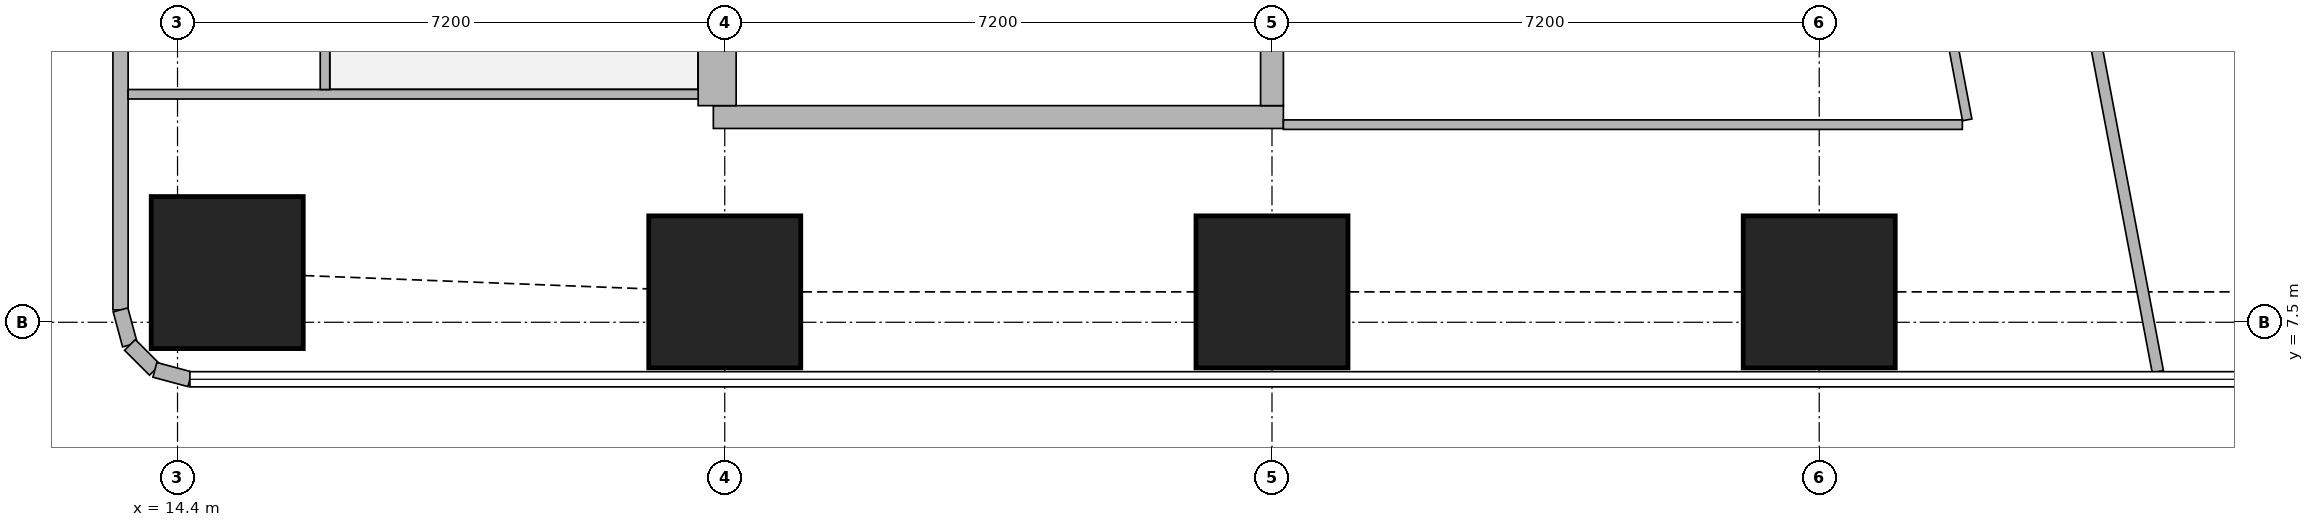
"""IFC4 building model, lengths in metres.
Left out: names, types, materials, properties, quantities, classifications, styles, units other than length and angle.
Written with IfcOpenShell. Run it as: python <this file> out.ifc"""

import sys

from ifc_helpers import new_model, si_unit, direction, frame, frame_2d, origin, origin_2d, place, context, subcontext, project, spatial, rectangle, extrude, element, fill, save


model = new_model("IFC4")
c1 = context("Model", 3, precision=1e-05, world=origin(), true_north=direction((0.0, 1.0)))
c2 = subcontext(c1, "Body", "Model", "MODEL_VIEW")
j1 = project(units=[si_unit("LENGTHUNIT", "METRE"), si_unit("PLANEANGLEUNIT", "RADIAN")], contexts=[c1])
p1 = place(None, origin())
s1 = spatial("IfcSite", under=j1, at=p1, CompositionType="ELEMENT")
p2 = place(p1, origin())
s2 = spatial("IfcBuilding", under=s1, at=p2, CompositionType="ELEMENT")
p3 = place(p2, frame((0.0, 0.0, 274.1)))
s3 = spatial("IfcBuildingStorey", under=s2, at=p3, CompositionType="ELEMENT", Elevation=274.1)
for number, where, z_axis, x_axis in (
    (1, (15.054, 8.154, 0.0), (0.0, 0.0, 1.0), (1.0, 0.0, 0.0)),
    (2, (21.6, 7.9, 0.0), (0.0, 0.0, 1.0), (1.0, 0.0, 0.0)),
    (3, (28.8, 7.9, 0.0), (0.0, 0.0, 1.0), (1.0, 0.0, 0.0)),
    (4, (36.0, 7.9, 0.0), (0.0, 0.0, 1.0), (1.0, 0.0, 0.0)),
):
    element("IfcColumn", number, at=place(p3, frame(where, z_axis=z_axis, x_axis=x_axis)), inside=s3, PredefinedType="COLUMN", context=c2, shape_type="SweptSolid", body=[
        extrude(rectangle(XDim=2.0, YDim=2.0, at=origin_2d()), origin(), (0.0, 0.0, 1.0), 3.75),
    ])
p4 = place(p3, frame((21.45, 10.2, 0.0), z_axis=(0.0, 0.0, 1.0), x_axis=(1.0, 0.0, 0.0)))
e5 = element("IfcWall", 5, at=p4, inside=s3, PredefinedType="SHEAR", context=c2, shape_type="SweptSolid", body=[
    extrude(rectangle(XDim=7.5, YDim=0.3, at=frame_2d((3.75, 0.0))), origin(), (0.0, 0.0, 1.0), 3.75),
])
p5 = place(p4, frame((1.2, 0.0, 0.0)))
e6 = element("IfcOpeningElement", 6, at=p5, cuts=e5, PredefinedType="OPENING", context=c2, shape_type="SweptSolid", body=[
    extrude(rectangle(XDim=1.1, YDim=2.1, at=frame_2d((0.55, 1.05))), frame((0.0, 0.16, 0.0), z_axis=(0.0, -1.0, 0.0), x_axis=(1.0, 0.0, 0.0)), (0.0, 0.0, 1.0), 0.32),
])
p6 = place(p3, frame((21.5, 10.35, 0.0), z_axis=(0.0, 0.0, 1.0), x_axis=(0.0, 1.0, 0.0)))
e7 = element("IfcWall", 7, at=p6, inside=s3, PredefinedType="SHEAR", context=c2, shape_type="SweptSolid", body=[
    extrude(rectangle(XDim=4.2, YDim=0.5, at=frame_2d((2.1, 0.0))), origin(), (0.0, 0.0, 1.0), 3.75),
])
p7 = place(p3, frame((28.8, 10.35, 0.0), z_axis=(0.0, 0.0, 1.0), x_axis=(0.0, 1.0, 0.0)))
e8 = element("IfcWall", 8, at=p7, inside=s3, PredefinedType="SHEAR", context=c2, shape_type="SweptSolid", body=[
    extrude(rectangle(XDim=4.2, YDim=0.3, at=frame_2d((2.1, 0.0))), origin(), (0.0, 0.0, 1.0), 3.75),
])
p8 = place(p3, frame((13.65, 43.037, 0.0), z_axis=(0.0, 0.0, 1.0), x_axis=(0.0, -1.0, 0.0)))
e9 = element("IfcWall", 9, at=p8, inside=s3, PredefinedType="SOLIDWALL", context=c2, shape_type="SweptSolid", body=[
    extrude(rectangle(XDim=35.374, YDim=0.2, at=frame_2d((17.687, 0.0))), origin(), (0.0, 0.0, 1.0), 3.5),
])
p9 = place(p8, frame((1.959, 0.0, 0.9)))
e10 = element("IfcOpeningElement", 10, at=p9, cuts=e9, PredefinedType="OPENING", context=c2, shape_type="SweptSolid", body=[
    extrude(rectangle(XDim=1.8, YDim=1.5, at=frame_2d((0.9, 0.75))), frame((0.0, 0.11, 0.0), z_axis=(0.0, -1.0, 0.0), x_axis=(1.0, 0.0, 0.0)), (0.0, 0.0, 1.0), 0.22),
])
p10 = place(p3, frame((13.65, 7.663, 0.0), z_axis=(0.0, 0.0, 1.0), x_axis=(0.259698463175, -0.965689757751, 0.0)))
e11 = element("IfcWall", 11, at=p10, inside=s3, PredefinedType="SOLIDWALL", context=c2, shape_type="SweptSolid", body=[
    extrude(rectangle(XDim=0.478, YDim=0.2, at=frame_2d((0.239, 0.0))), origin(), (0.0, 0.0, 1.0), 3.5),
])
p11 = place(p3, frame((13.774, 7.202, 0.0), z_axis=(0.0, 0.0, 1.0), x_axis=(0.707369890659, -0.706843573776, 0.0)))
e12 = element("IfcWall", 12, at=p11, inside=s3, PredefinedType="SOLIDWALL", context=c2, shape_type="SweptSolid", body=[
    extrude(rectangle(XDim=0.464, YDim=0.2, at=frame_2d((0.232, 0.0))), origin(), (0.0, 0.0, 1.0), 3.5),
])
p12 = place(p3, frame((14.102, 6.874, 0.0), z_axis=(0.0, 0.0, 1.0), x_axis=(0.965655254015, -0.259826731483, 0.0)))
e13 = element("IfcWall", 13, at=p12, inside=s3, PredefinedType="SOLIDWALL", context=c2, shape_type="SweptSolid", body=[
    extrude(rectangle(XDim=0.477, YDim=0.2, at=frame_2d((0.239, 0.0))), origin(), (0.0, 0.0, 1.0), 3.5),
])
p13 = place(p3, frame((33.781, 42.186, 0.0), z_axis=(0.0, 0.0, 1.0), x_axis=(0.185593518645, -0.9826266055, 0.0)))
e14 = element("IfcWall", 14, at=p13, inside=s3, PredefinedType="SOLIDWALL", context=c2, shape_type="SweptSolid", body=[
    extrude(rectangle(XDim=35.961, YDim=0.15, at=frame_2d((17.98, 0.0))), origin(), (0.0, 0.0, 1.0), 2.5),
])
p14 = place(p13, frame((11.76, 0.0, 0.0)))
e15 = element("IfcOpeningElement", 15, at=p14, cuts=e14, PredefinedType="OPENING", context=c2, shape_type="SweptSolid", body=[
    extrude(rectangle(XDim=1.0, YDim=2.1, at=frame_2d((0.5, 1.05))), frame((0.0, 0.085, 0.0), z_axis=(0.0, -1.0, 0.0), x_axis=(1.0, 0.0, 0.0)), (0.0, 0.0, 1.0), 0.17),
])
p15 = place(p13, frame((15.576, 0.0, 0.0)))
e16 = element("IfcOpeningElement", 16, at=p15, cuts=e14, PredefinedType="OPENING", context=c2, shape_type="SweptSolid", body=[
    extrude(rectangle(XDim=1.0, YDim=2.1, at=frame_2d((0.5, 1.05))), frame((0.0, 0.085, 0.0), z_axis=(0.0, -1.0, 0.0), x_axis=(1.0, 0.0, 0.0)), (0.0, 0.0, 1.0), 0.17),
])
p16 = place(p13, frame((30.502, 0.0, 0.0)))
e17 = element("IfcOpeningElement", 17, at=p16, cuts=e14, PredefinedType="OPENING", context=c2, shape_type="SweptSolid", body=[
    extrude(rectangle(XDim=1.0, YDim=2.1, at=frame_2d((0.5, 1.05))), frame((0.0, 0.085, 0.0), z_axis=(0.0, -1.0, 0.0), x_axis=(1.0, 0.0, 0.0)), (0.0, 0.0, 1.0), 0.17),
])
p17 = place(p3, frame((13.75, 10.5, 0.0), z_axis=(0.0, 0.0, 1.0), x_axis=(1.0, 0.0, 0.0)))
e18 = element("IfcWall", 18, at=p17, inside=s3, PredefinedType="PARTITIONING", context=c2, shape_type="SweptSolid", body=[
    extrude(rectangle(XDim=7.5, YDim=0.125, at=frame_2d((3.75, 0.0))), origin(), (0.0, 0.0, 1.0), 3.5),
])
p18 = place(p17, frame((4.245, 0.0, 0.0)))
e19 = element("IfcOpeningElement", 19, at=p18, cuts=e18, PredefinedType="OPENING", context=c2, shape_type="SweptSolid", body=[
    extrude(rectangle(XDim=1.8, YDim=2.1, at=frame_2d((0.9, 1.05))), frame((0.0, 0.073, 0.0), z_axis=(0.0, -1.0, 0.0), x_axis=(1.0, 0.0, 0.0)), (0.0, 0.0, 1.0), 0.145),
])
p19 = place(p3, frame((16.34, 10.562, 0.0), z_axis=(0.0, 0.0, 1.0), x_axis=(0.0, 1.0, 0.0)))
e20 = element("IfcWall", 20, at=p19, inside=s3, PredefinedType="PARTITIONING", context=c2, shape_type="SweptSolid", body=[
    extrude(rectangle(XDim=3.988, YDim=0.125, at=frame_2d((1.994, 0.0))), origin(), (0.0, 0.0, 1.0), 3.5),
])
p20 = place(p19, frame((1.438, 0.0, 0.0)))
e21 = element("IfcOpeningElement", 21, at=p20, cuts=e20, PredefinedType="OPENING", context=c2, shape_type="SweptSolid", body=[
    extrude(rectangle(XDim=1.0, YDim=2.1, at=frame_2d((0.5, 1.05))), frame((0.0, 0.073, 0.0), z_axis=(0.0, -1.0, 0.0), x_axis=(1.0, 0.0, 0.0)), (0.0, 0.0, 1.0), 0.145),
])
p21 = place(p3, frame((28.95, 10.1, 0.0), z_axis=(0.0, 0.0, 1.0), x_axis=(1.0, 0.0, 0.0)))
e22 = element("IfcWall", 22, at=p21, inside=s3, PredefinedType="PARTITIONING", context=c2, shape_type="SweptSolid", body=[
    extrude(rectangle(XDim=8.933, YDim=0.125, at=frame_2d((4.467, 0.0))), origin(), (0.0, 0.0, 1.0), 3.5),
])
p22 = place(p3, frame((37.947, 10.163, 0.0), z_axis=(0.0, 0.0, 1.0), x_axis=(-0.185572770922, 0.982630523998, 0.0)))
e23 = element("IfcWall", 23, at=p22, inside=s3, PredefinedType="PARTITIONING", context=c2, shape_type="SweptSolid", body=[
    extrude(rectangle(XDim=25.111, YDim=0.125, at=frame_2d((12.556, 0.0))), origin(), (0.0, 0.0, 1.0), 2.5),
])
p23 = place(p22, frame((0.708, 0.0, 0.0)))
e24 = element("IfcOpeningElement", 24, at=p23, cuts=e23, PredefinedType="OPENING", context=c2, shape_type="SweptSolid", body=[
    extrude(rectangle(XDim=1.0, YDim=2.1, at=frame_2d((0.5, 1.05))), frame((0.0, 0.073, 0.0), z_axis=(0.0, -1.0, 0.0), x_axis=(1.0, 0.0, 0.0)), (0.0, 0.0, 1.0), 0.145),
])
p24 = place(p22, frame((5.9, 0.0, 0.0)))
e25 = element("IfcOpeningElement", 25, at=p24, cuts=e23, PredefinedType="OPENING", context=c2, shape_type="SweptSolid", body=[
    extrude(rectangle(XDim=1.0, YDim=2.1, at=frame_2d((0.5, 1.05))), frame((0.0, 0.073, 0.0), z_axis=(0.0, -1.0, 0.0), x_axis=(1.0, 0.0, 0.0)), (0.0, 0.0, 1.0), 0.145),
])
p25 = place(p22, frame((13.378, 0.0, 0.0)))
e26 = element("IfcOpeningElement", 26, at=p25, cuts=e23, PredefinedType="OPENING", context=c2, shape_type="SweptSolid", body=[
    extrude(rectangle(XDim=1.0, YDim=2.1, at=frame_2d((0.5, 1.05))), frame((0.0, 0.073, 0.0), z_axis=(0.0, -1.0, 0.0), x_axis=(1.0, 0.0, 0.0)), (0.0, 0.0, 1.0), 0.145),
])
p26 = place(p22, frame((21.15, 0.0, 0.0)))
e27 = element("IfcOpeningElement", 27, at=p26, cuts=e23, PredefinedType="OPENING", context=c2, shape_type="SweptSolid", body=[
    extrude(rectangle(XDim=1.0, YDim=2.1, at=frame_2d((0.5, 1.05))), frame((0.0, 0.073, 0.0), z_axis=(0.0, -1.0, 0.0), x_axis=(1.0, 0.0, 0.0)), (0.0, 0.0, 1.0), 0.145),
])
p27 = place(p18, origin())
e28 = element("IfcDoor", 28, at=p27, inside=s3, OperationType="DOUBLE_DOOR_SINGLE_SWING", PredefinedType="DOOR", context=c2, shape_type="SweptSolid", body=[
    extrude(rectangle(XDim=1.8, YDim=2.1, at=frame_2d((0.9, 1.05))), frame((0.0, 0.025, 0.0), z_axis=(0.0, -1.0, 0.0), x_axis=(1.0, 0.0, 0.0)), (0.0, 0.0, 1.0), 0.05),
])
fill(e19, e28)
p28 = place(p23, origin())
e29 = element("IfcDoor", 29, at=p28, inside=s3, OperationType="SINGLE_SWING_LEFT", PredefinedType="DOOR", context=c2, shape_type="SweptSolid", body=[
    extrude(rectangle(XDim=1.0, YDim=2.1, at=frame_2d((0.5, 1.05))), frame((0.0, 0.025, 0.0), z_axis=(0.0, -1.0, 0.0), x_axis=(1.0, 0.0, 0.0)), (0.0, 0.0, 1.0), 0.05),
])
fill(e24, e29)
p29 = place(p5, origin())
e30 = element("IfcDoor", 30, at=p29, inside=s3, OperationType="SINGLE_SWING_LEFT", PredefinedType="DOOR", context=c2, shape_type="SweptSolid", body=[
    extrude(rectangle(XDim=1.1, YDim=2.1, at=frame_2d((0.55, 1.05))), frame((0.0, 0.025, 0.0), z_axis=(0.0, -1.0, 0.0), x_axis=(1.0, 0.0, 0.0)), (0.0, 0.0, 1.0), 0.05),
])
fill(e6, e30)
save(model, sys.argv[1])
